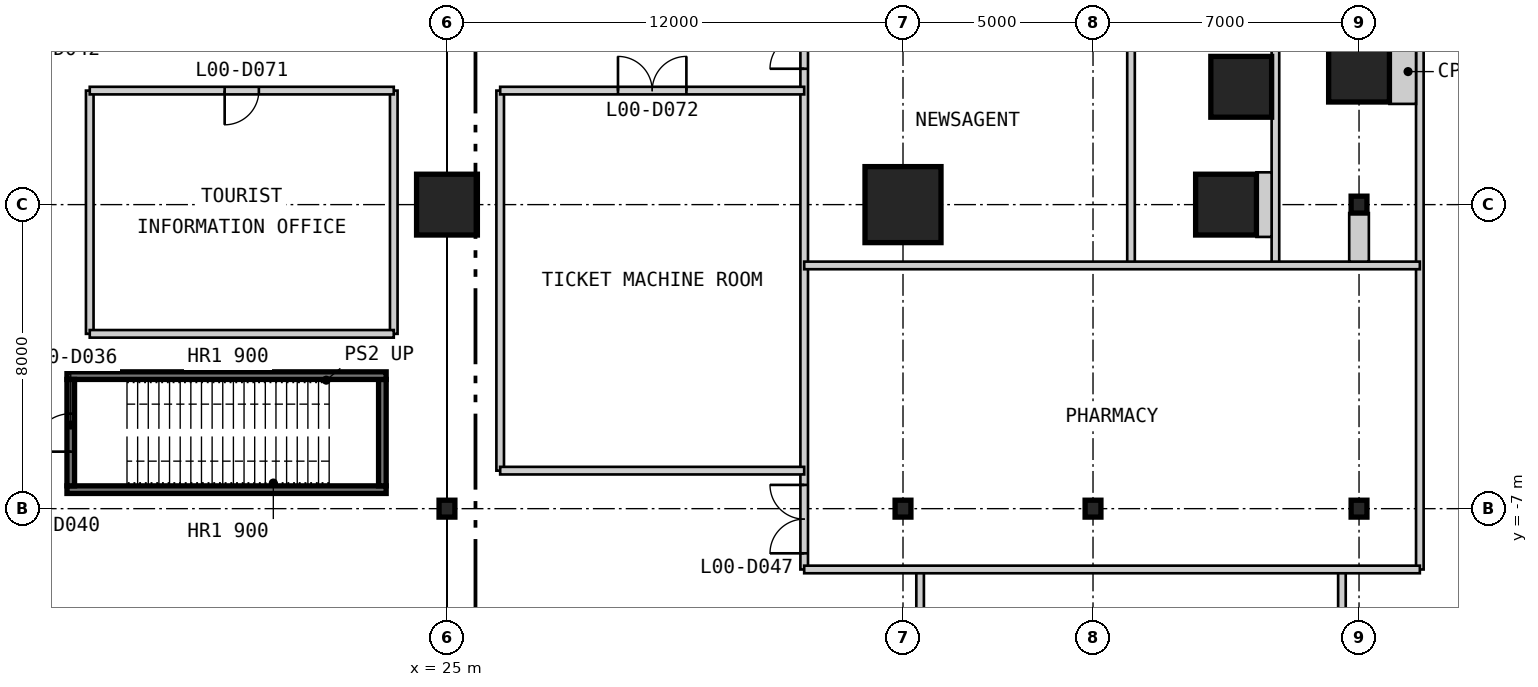
"""IFC4 building model, lengths in metres.
Left out: names, types, materials, properties, quantities, classifications, styles, units other than length and angle.
Written with IfcOpenShell. Run it as: python <this file> out.ifc"""

import sys

from ifc_helpers import new_model, si_unit, direction, frame, frame_2d, origin, origin_2d, place, context, subcontext, project, spatial, rectangle, i_section, extrude, element, fill, save


model = new_model("IFC4")
c1 = context("Model", 3, precision=1e-05, world=origin(), true_north=direction((0.0, 1.0)))
c2 = subcontext(c1, "Body", "Model", "MODEL_VIEW")
j1 = project(units=[si_unit("LENGTHUNIT", "METRE"), si_unit("PLANEANGLEUNIT", "RADIAN")], contexts=[c1])
p1 = place(None, origin())
s1 = spatial("IfcSite", under=j1, at=p1, CompositionType="ELEMENT")
p2 = place(p1, origin())
s2 = spatial("IfcBuilding", under=s1, at=p2, CompositionType="ELEMENT")
p3 = place(p2, origin())
s3 = spatial("IfcBuildingStorey", under=s2, at=p3, CompositionType="ELEMENT", Elevation=0.0)
p4 = place(p3, frame((25.0, 1.0, 0.0), z_axis=(0.0, 0.0, 1.0), x_axis=(1.0, 0.0, 0.0)))
e1 = element("IfcColumn", 1, at=p4, inside=s3, PredefinedType="COLUMN", context=c2, shape_type="SweptSolid", body=[
    extrude(rectangle(XDim=1.6, YDim=1.6, at=origin_2d()), origin(), (0.0, 0.0, 1.0), 7.0),
])
p5 = place(p3, frame((37.0, 1.0, 0.0), z_axis=(0.0, 0.0, 1.0), x_axis=(1.0, 0.0, 0.0)))
e2 = element("IfcColumn", 2, at=p5, inside=s3, PredefinedType="COLUMN", context=c2, shape_type="SweptSolid", body=[
    extrude(rectangle(XDim=2.0, YDim=2.0, at=origin_2d()), origin(), (0.0, 0.0, 1.0), 7.0),
])
for number, where, z_axis, x_axis in (
    (3, (45.5, 1.0, 0.0), (0.0, 0.0, 1.0), (1.0, 0.0, 0.0)),
    (4, (45.9, 4.1, 0.0), (0.0, 0.0, 1.0), (1.0, 0.0, 0.0)),
    (5, (49.0, 4.5, 0.0), (0.0, 0.0, 1.0), (1.0, 0.0, 0.0)),
):
    element("IfcColumn", number, at=place(p3, frame(where, z_axis=z_axis, x_axis=x_axis)), inside=s3, PredefinedType="COLUMN", context=c2, shape_type="SweptSolid", body=[
        extrude(rectangle(XDim=1.6, YDim=1.6, at=origin_2d()), origin(), (0.0, 0.0, 1.0), 7.0),
    ])
for number, where, z_axis, x_axis in (
    (6, (25.0, -7.0, 0.0), (0.0, 0.0, 1.0), (1.0, 0.0, 0.0)),
    (7, (37.0, -7.0, 0.0), (0.0, 0.0, 1.0), (1.0, 0.0, 0.0)),
    (8, (42.0, -7.0, 0.0), (0.0, 0.0, 1.0), (1.0, 0.0, 0.0)),
    (9, (49.0, -7.0, 0.0), (0.0, 0.0, 1.0), (1.0, 0.0, 0.0)),
    (10, (49.0, 1.0, 0.0), (0.0, 0.0, 1.0), (1.0, 0.0, 0.0)),
):
    element("IfcColumn", number, at=place(p3, frame(where, z_axis=z_axis, x_axis=x_axis)), inside=s3, PredefinedType="COLUMN", context=c2, shape_type="SweptSolid", body=[
        extrude(i_section(OverallWidth=0.417, OverallDepth=0.445, WebThickness=0.039, FlangeThickness=0.063, at=origin_2d()), origin(), (0.0, 0.0, 1.0), 7.0),
    ])
p6 = place(p3, frame((15.0, -6.5, 0.0), z_axis=(0.0, 0.0, 1.0), x_axis=(1.0, 0.0, 0.0)))
e11 = element("IfcWall", 11, at=p6, inside=s3, PredefinedType="SOLIDWALL", context=c2, shape_type="SweptSolid", body=[
    extrude(rectangle(XDim=8.4, YDim=0.2, at=frame_2d((4.2, 0.0))), origin(), (0.0, 0.0, 1.0), 7.0),
])
p7 = place(p3, frame((23.3, -6.4, 0.0), z_axis=(0.0, 0.0, 1.0), x_axis=(0.0, 1.0, 0.0)))
e12 = element("IfcWall", 12, at=p7, inside=s3, PredefinedType="SOLIDWALL", context=c2, shape_type="SweptSolid", body=[
    extrude(rectangle(XDim=2.8, YDim=0.2, at=frame_2d((1.4, 0.0))), origin(), (0.0, 0.0, 1.0), 7.0),
])
p8 = place(p3, frame((23.4, -3.5, 0.0), z_axis=(0.0, 0.0, 1.0), x_axis=(-1.0, 0.0, 0.0)))
e13 = element("IfcWall", 13, at=p8, inside=s3, PredefinedType="SOLIDWALL", context=c2, shape_type="SweptSolid", body=[
    extrude(rectangle(XDim=8.4, YDim=0.2, at=frame_2d((4.2, 0.0))), origin(), (0.0, 0.0, 1.0), 7.0),
])
p9 = place(p3, frame((15.1, -3.6, 0.0), z_axis=(0.0, 0.0, 1.0), x_axis=(0.0, -1.0, 0.0)))
e14 = element("IfcWall", 14, at=p9, inside=s3, PredefinedType="SOLIDWALL", context=c2, shape_type="SweptSolid", body=[
    extrude(rectangle(XDim=2.8, YDim=0.2, at=frame_2d((1.4, 0.0))), origin(), (0.0, 0.0, 1.0), 7.0),
])
p10 = place(p9, frame((0.9, 0.0, 0.0)))
e15 = element("IfcOpeningElement", 15, at=p10, cuts=e14, PredefinedType="OPENING", context=c2, shape_type="SweptSolid", body=[
    extrude(rectangle(XDim=1.0, YDim=2.2, at=frame_2d((0.5, 1.1))), frame((0.0, 0.11, 0.0), z_axis=(0.0, -1.0, 0.0), x_axis=(1.0, 0.0, 0.0)), (0.0, 0.0, 1.0), 0.22),
])
for number, where, z_axis, x_axis in (
    (16, (15.6, -2.4, 0.0), (0.0, 0.0, 1.0), (0.0, 1.0, 0.0)),
    (17, (23.6, -2.4, 0.0), (0.0, 0.0, 1.0), (0.0, 1.0, 0.0)),
):
    element("IfcWall", number, at=place(p3, frame(where, z_axis=z_axis, x_axis=x_axis)), inside=s3, PredefinedType="PARTITIONING", context=c2, shape_type="SweptSolid", body=[
        extrude(rectangle(XDim=6.4, YDim=0.2, at=frame_2d((3.2, 0.0))), origin(), (0.0, 0.0, 1.0), 6.7),
    ])
p11 = place(p3, frame((26.4, -6.0, 0.0), z_axis=(0.0, 0.0, 1.0), x_axis=(0.0, 1.0, 0.0)))
e18 = element("IfcWall", 18, at=p11, inside=s3, PredefinedType="PARTITIONING", context=c2, shape_type="SweptSolid", body=[
    extrude(rectangle(XDim=10.0, YDim=0.2, at=frame_2d((5.0, 0.0))), origin(), (0.0, 0.0, 1.0), 6.7),
])
p12 = place(p3, frame((34.4, -8.6, 0.0), z_axis=(0.0, 0.0, 1.0), x_axis=(0.0, 1.0, 0.0)))
e19 = element("IfcWall", 19, at=p12, inside=s3, PredefinedType="PARTITIONING", context=c2, shape_type="SweptSolid", body=[
    extrude(rectangle(XDim=15.6, YDim=0.2, at=frame_2d((7.8, 0.0))), origin(), (0.0, 0.0, 1.0), 6.7),
])
p13 = place(p12, frame((0.425, 0.0, 0.0)))
e20 = element("IfcOpeningElement", 20, at=p13, cuts=e19, PredefinedType="OPENING", context=c2, shape_type="SweptSolid", body=[
    extrude(rectangle(XDim=1.8, YDim=2.4, at=frame_2d((0.9, 1.2))), frame((0.0, 0.11, 0.0), z_axis=(0.0, -1.0, 0.0), x_axis=(1.0, 0.0, 0.0)), (0.0, 0.0, 1.0), 0.22),
])
p14 = place(p12, frame((13.175, 0.0, 0.0)))
e21 = element("IfcOpeningElement", 21, at=p14, cuts=e19, PredefinedType="OPENING", context=c2, shape_type="SweptSolid", body=[
    extrude(rectangle(XDim=1.8, YDim=2.4, at=frame_2d((0.9, 1.2))), frame((0.0, 0.11, 0.0), z_axis=(0.0, -1.0, 0.0), x_axis=(1.0, 0.0, 0.0)), (0.0, 0.0, 1.0), 0.22),
])
p15 = place(p3, frame((37.45, -15.25, 0.0), z_axis=(0.0, 0.0, 1.0), x_axis=(0.0, 1.0, 0.0)))
e22 = element("IfcWall", 22, at=p15, inside=s3, PredefinedType="PARTITIONING", context=c2, shape_type="SweptSolid", body=[
    extrude(rectangle(XDim=6.65, YDim=0.2, at=frame_2d((3.325, 0.0))), origin(), (0.0, 0.0, 1.0), 6.7),
])
p16 = place(p15, frame((2.425, 0.0, 0.0)))
e23 = element("IfcOpeningElement", 23, at=p16, cuts=e22, PredefinedType="OPENING", context=c2, shape_type="SweptSolid", body=[
    extrude(rectangle(XDim=1.8, YDim=2.4, at=frame_2d((0.9, 1.2))), frame((0.0, 0.11, 0.0), z_axis=(0.0, -1.0, 0.0), x_axis=(1.0, 0.0, 0.0)), (0.0, 0.0, 1.0), 0.22),
])
p17 = place(p3, frame((43.0, -0.6, 0.0), z_axis=(0.0, 0.0, 1.0), x_axis=(0.0, 1.0, 0.0)))
e24 = element("IfcWall", 24, at=p17, inside=s3, PredefinedType="PARTITIONING", context=c2, shape_type="SweptSolid", body=[
    extrude(rectangle(XDim=28.6, YDim=0.2, at=frame_2d((14.3, 0.0))), origin(), (0.0, 0.0, 1.0), 6.043),
])
p18 = place(p3, frame((46.8, -0.6, 0.0), z_axis=(0.0, 0.0, 1.0), x_axis=(0.0, 1.0, 0.0)))
e25 = element("IfcWall", 25, at=p18, inside=s3, PredefinedType="PARTITIONING", context=c2, shape_type="SweptSolid", body=[
    extrude(rectangle(XDim=16.2, YDim=0.2, at=frame_2d((8.1, 0.0))), origin(), (0.0, 0.0, 1.0), 6.7),
])
p19 = place(p3, frame((48.55, -15.25, 0.0), z_axis=(0.0, 0.0, 1.0), x_axis=(0.0, 1.0, 0.0)))
e26 = element("IfcWall", 26, at=p19, inside=s3, PredefinedType="PARTITIONING", context=c2, shape_type="SweptSolid", body=[
    extrude(rectangle(XDim=6.65, YDim=0.2, at=frame_2d((3.325, 0.0))), origin(), (0.0, 0.0, 1.0), 6.7),
])
p20 = place(p3, frame((50.6, -8.6, 0.0), z_axis=(0.0, 0.0, 1.0), x_axis=(0.0, 1.0, 0.0)))
e27 = element("IfcWall", 27, at=p20, inside=s3, PredefinedType="PARTITIONING", context=c2, shape_type="SweptSolid", body=[
    extrude(rectangle(XDim=24.2, YDim=0.2, at=frame_2d((12.1, 0.0))), origin(), (0.0, 0.0, 1.0), 6.7),
])
p21 = place(p3, frame((34.4, -8.6, 0.0), z_axis=(0.0, 0.0, 1.0), x_axis=(1.0, 0.0, 0.0)))
e28 = element("IfcWall", 28, at=p21, inside=s3, PredefinedType="PARTITIONING", context=c2, shape_type="SweptSolid", body=[
    extrude(rectangle(XDim=16.2, YDim=0.2, at=frame_2d((8.1, 0.0))), origin(), (0.0, 0.0, 1.0), 6.7),
])
for number, where, z_axis, x_axis in (
    (29, (26.4, -6.0, 0.0), (0.0, 0.0, 1.0), (1.0, 0.0, 0.0)),
    (30, (15.6, -2.4, 0.0), (0.0, 0.0, 1.0), (1.0, 0.0, 0.0)),
):
    element("IfcWall", number, at=place(p3, frame(where, z_axis=z_axis, x_axis=x_axis)), inside=s3, PredefinedType="PARTITIONING", context=c2, shape_type="SweptSolid", body=[
        extrude(rectangle(XDim=8.0, YDim=0.2, at=frame_2d((4.0, 0.0))), origin(), (0.0, 0.0, 1.0), 6.7),
    ])
p22 = place(p3, frame((34.4, -0.6, 0.0), z_axis=(0.0, 0.0, 1.0), x_axis=(1.0, 0.0, 0.0)))
e31 = element("IfcWall", 31, at=p22, inside=s3, PredefinedType="PARTITIONING", context=c2, shape_type="SweptSolid", body=[
    extrude(rectangle(XDim=16.2, YDim=0.2, at=frame_2d((8.1, 0.0))), origin(), (0.0, 0.0, 1.0), 6.7),
])
p23 = place(p3, frame((15.6, 4.0, 0.0), z_axis=(0.0, 0.0, 1.0), x_axis=(1.0, 0.0, 0.0)))
e32 = element("IfcWall", 32, at=p23, inside=s3, PredefinedType="PARTITIONING", context=c2, shape_type="SweptSolid", body=[
    extrude(rectangle(XDim=8.0, YDim=0.2, at=frame_2d((4.0, 0.0))), origin(), (0.0, 0.0, 1.0), 6.7),
])
p24 = place(p23, frame((3.55, 0.0, 0.0)))
e33 = element("IfcOpeningElement", 33, at=p24, cuts=e32, PredefinedType="OPENING", context=c2, shape_type="SweptSolid", body=[
    extrude(rectangle(XDim=0.9, YDim=2.2, at=frame_2d((0.45, 1.1))), frame((0.0, 0.11, 0.0), z_axis=(0.0, -1.0, 0.0), x_axis=(1.0, 0.0, 0.0)), (0.0, 0.0, 1.0), 0.22),
])
p25 = place(p3, frame((26.4, 4.0, 0.0), z_axis=(0.0, 0.0, 1.0), x_axis=(1.0, 0.0, 0.0)))
e34 = element("IfcWall", 34, at=p25, inside=s3, PredefinedType="PARTITIONING", context=c2, shape_type="SweptSolid", body=[
    extrude(rectangle(XDim=8.0, YDim=0.2, at=frame_2d((4.0, 0.0))), origin(), (0.0, 0.0, 1.0), 6.7),
])
p26 = place(p25, frame((3.1, 0.0, 0.0)))
e35 = element("IfcOpeningElement", 35, at=p26, cuts=e34, PredefinedType="OPENING", context=c2, shape_type="SweptSolid", body=[
    extrude(rectangle(XDim=1.8, YDim=2.4, at=frame_2d((0.9, 1.2))), frame((0.0, 0.11, 0.0), z_axis=(0.0, -1.0, 0.0), x_axis=(1.0, 0.0, 0.0)), (0.0, 0.0, 1.0), 0.22),
])
p27 = place(p3, frame((46.7, 1.0, 0.0), z_axis=(0.0, 0.0, 1.0), x_axis=(-1.0, 0.0, 0.0)))
e36 = element("IfcWall", 36, at=p27, inside=s3, PredefinedType="PARTITIONING", context=c2, shape_type="SweptSolid", body=[
    extrude(rectangle(XDim=0.4, YDim=1.7, at=frame_2d((0.2, 0.0))), origin(), (0.0, 0.0, 1.0), 6.7),
])
p28 = place(p3, frame((50.5, 4.5, 0.0), z_axis=(0.0, 0.0, 1.0), x_axis=(-1.0, 0.0, 0.0)))
e37 = element("IfcWall", 37, at=p28, inside=s3, PredefinedType="PARTITIONING", context=c2, shape_type="SweptSolid", body=[
    extrude(rectangle(XDim=0.7, YDim=1.7, at=frame_2d((0.35, 0.0))), origin(), (0.0, 0.0, 1.0), 6.7),
])
p29 = place(p3, frame((49.0, -0.5, 0.0), z_axis=(0.0, 0.0, 1.0), x_axis=(0.0, 1.0, 0.0)))
e38 = element("IfcWall", 38, at=p29, inside=s3, PredefinedType="PARTITIONING", context=c2, shape_type="SweptSolid", body=[
    extrude(rectangle(XDim=1.278, YDim=0.517, at=frame_2d((0.639, 0.0))), origin(), (0.0, 0.0, 1.0), 5.954),
])
p30 = place(p10, frame((1.0, 0.0, 0.0), z_axis=(0.0, 0.0, 1.0), x_axis=(-1.0, 0.0, 0.0)))
e39 = element("IfcDoor", 39, at=p30, inside=s3, OperationType="SINGLE_SWING_LEFT", PredefinedType="DOOR", context=c2, shape_type="SweptSolid", body=[
    extrude(rectangle(XDim=1.0, YDim=2.2, at=frame_2d((0.5, 1.1))), frame((0.0, 0.025, 0.0), z_axis=(0.0, -1.0, 0.0), x_axis=(1.0, 0.0, 0.0)), (0.0, 0.0, 1.0), 0.05),
])
fill(e15, e39)
p31 = place(p13, origin())
e40 = element("IfcDoor", 40, at=p31, inside=s3, OperationType="DOUBLE_DOOR_SINGLE_SWING", PredefinedType="DOOR", context=c2, shape_type="SweptSolid", body=[
    extrude(rectangle(XDim=1.8, YDim=2.4, at=frame_2d((0.9, 1.2))), frame((0.0, 0.025, 0.0), z_axis=(0.0, -1.0, 0.0), x_axis=(1.0, 0.0, 0.0)), (0.0, 0.0, 1.0), 0.05),
])
fill(e20, e40)
p32 = place(p14, origin())
e41 = element("IfcDoor", 41, at=p32, inside=s3, OperationType="DOUBLE_DOOR_SINGLE_SWING", PredefinedType="DOOR", context=c2, shape_type="SweptSolid", body=[
    extrude(rectangle(XDim=1.8, YDim=2.4, at=frame_2d((0.9, 1.2))), frame((0.0, 0.025, 0.0), z_axis=(0.0, -1.0, 0.0), x_axis=(1.0, 0.0, 0.0)), (0.0, 0.0, 1.0), 0.05),
])
fill(e21, e41)
p33 = place(p24, frame((0.9, 0.0, 0.0), z_axis=(0.0, 0.0, 1.0), x_axis=(-1.0, 0.0, 0.0)))
e42 = element("IfcDoor", 42, at=p33, inside=s3, OperationType="SINGLE_SWING_RIGHT", PredefinedType="DOOR", context=c2, shape_type="SweptSolid", body=[
    extrude(rectangle(XDim=0.9, YDim=2.2, at=frame_2d((0.45, 1.1))), frame((0.0, 0.025, 0.0), z_axis=(0.0, -1.0, 0.0), x_axis=(1.0, 0.0, 0.0)), (0.0, 0.0, 1.0), 0.05),
])
fill(e33, e42)
p34 = place(p26, origin())
e43 = element("IfcDoor", 43, at=p34, inside=s3, OperationType="DOUBLE_DOOR_SINGLE_SWING", PredefinedType="DOOR", context=c2, shape_type="SweptSolid", body=[
    extrude(rectangle(XDim=1.8, YDim=2.4, at=frame_2d((0.9, 1.2))), frame((0.0, 0.025, 0.0), z_axis=(0.0, -1.0, 0.0), x_axis=(1.0, 0.0, 0.0)), (0.0, 0.0, 1.0), 0.05),
])
fill(e35, e43)
save(model, sys.argv[1])
